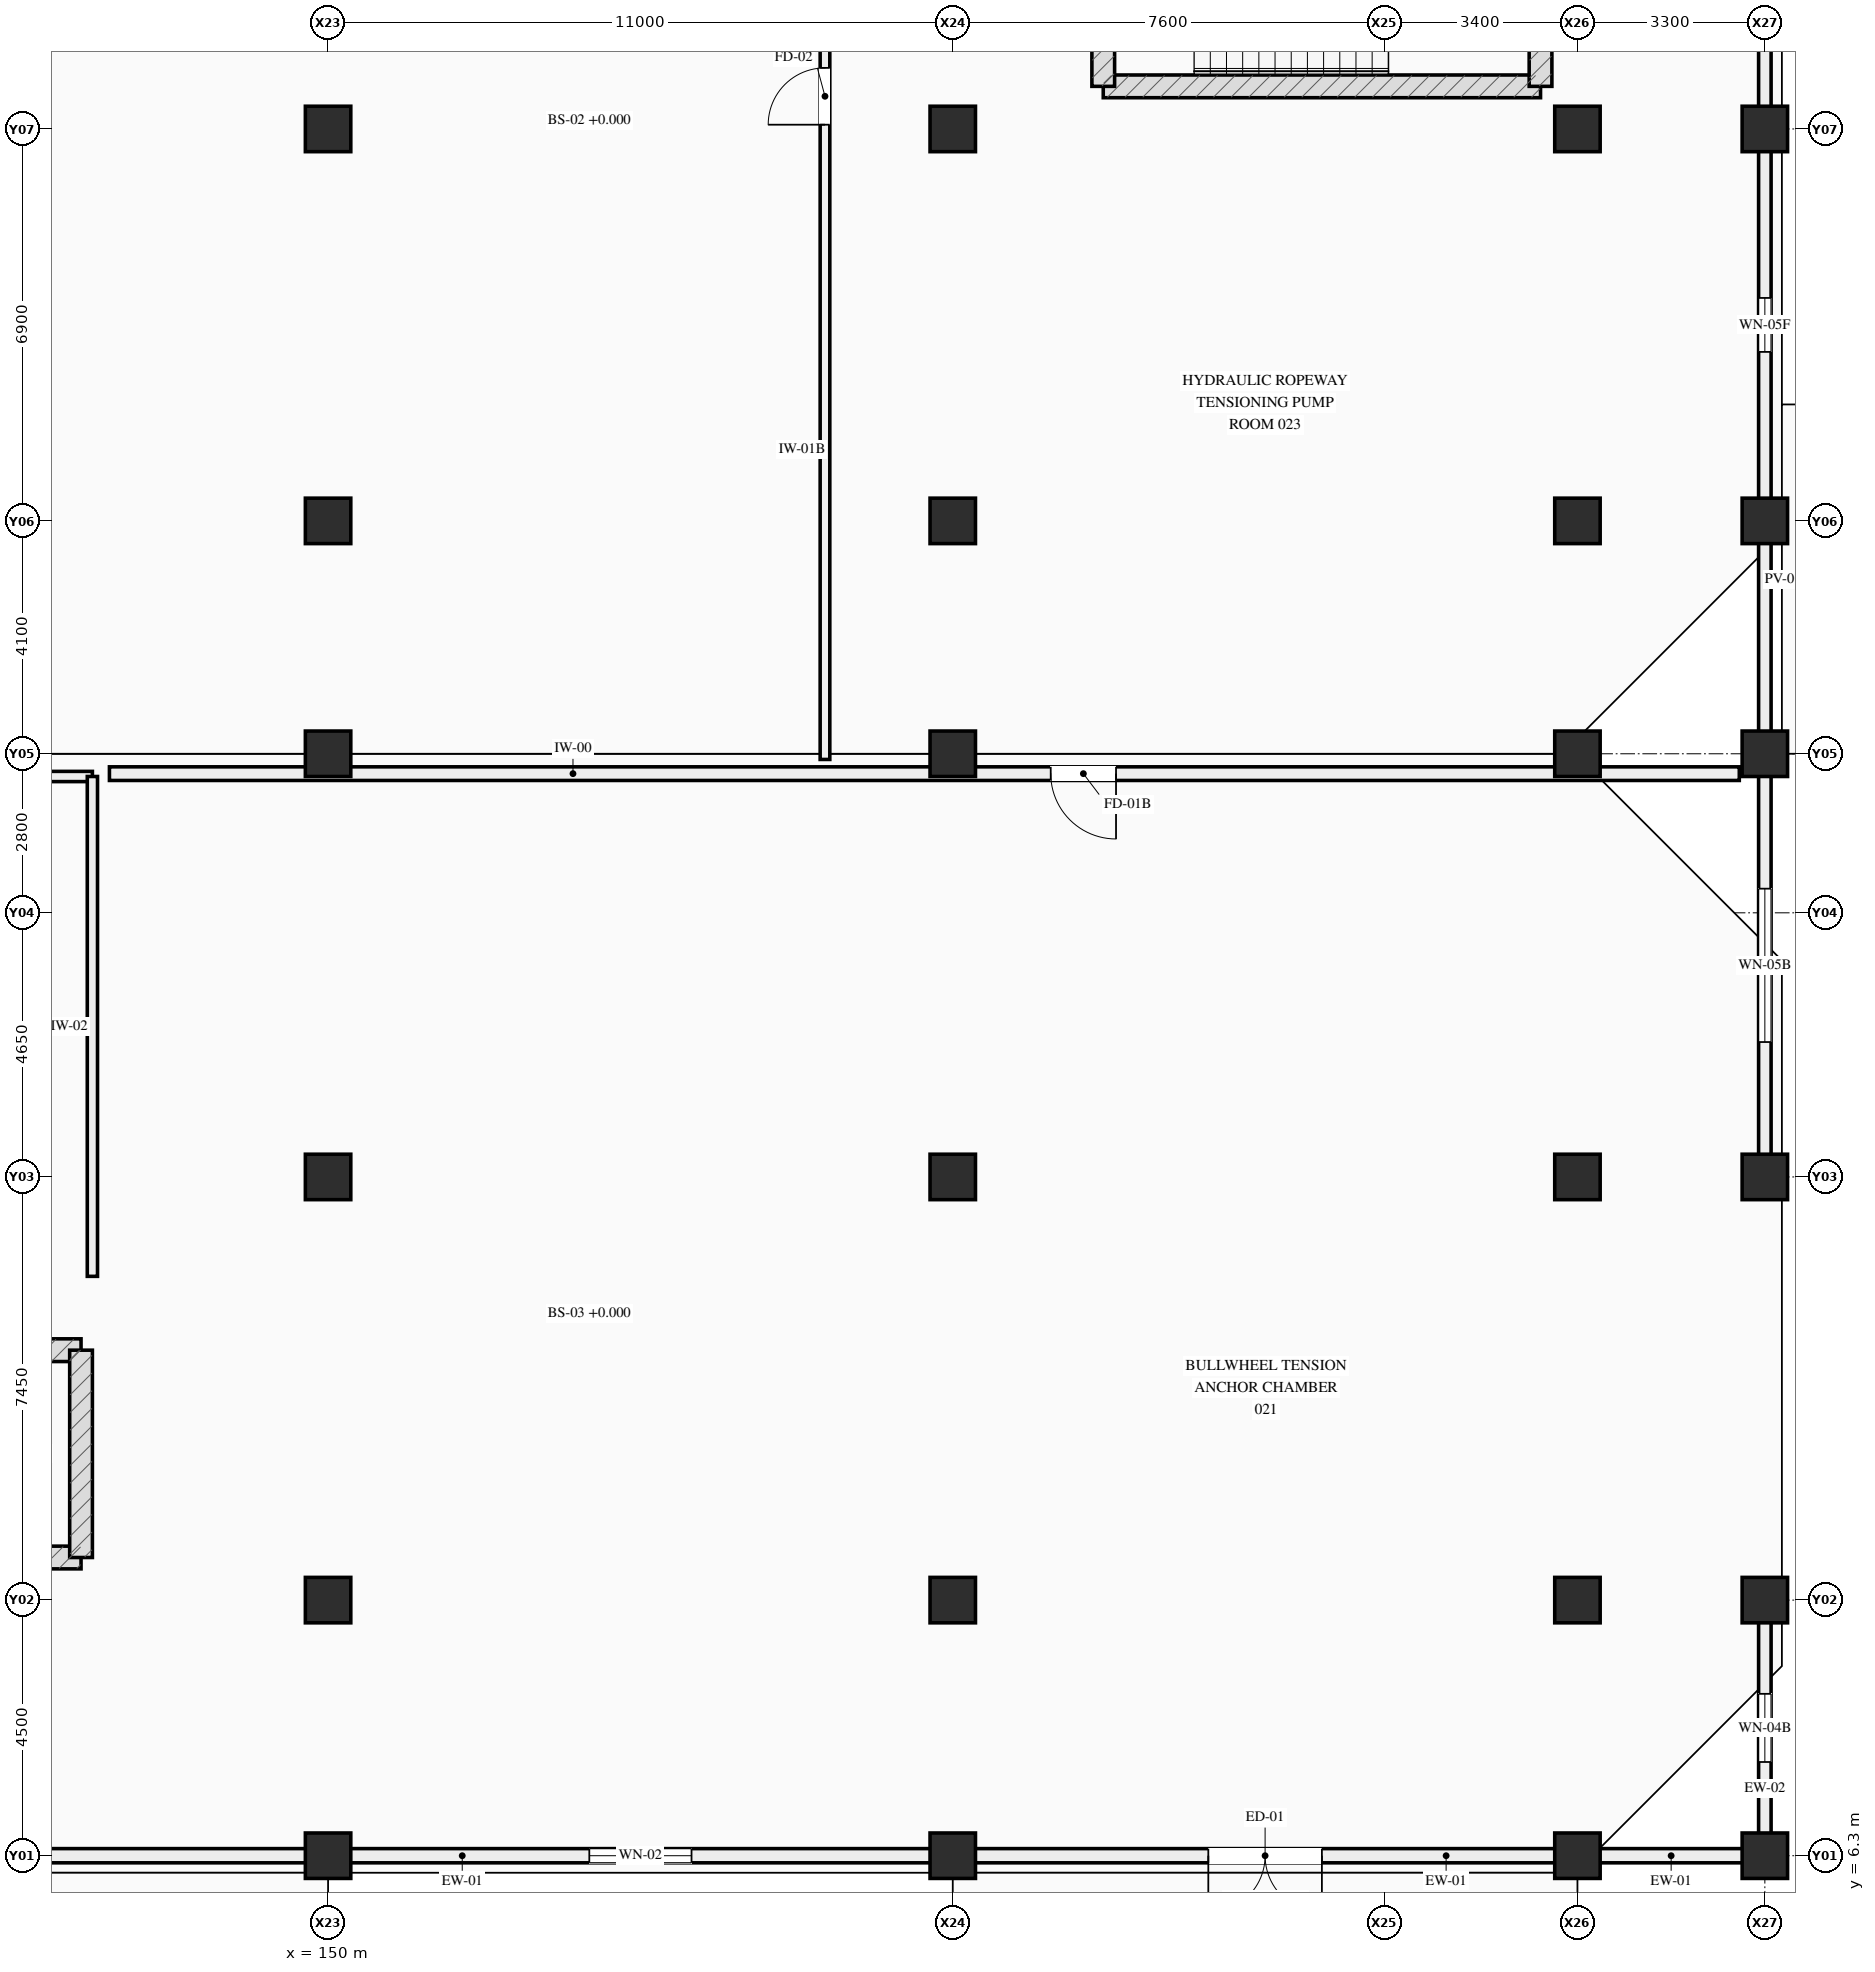
"""IFC4 building model, lengths in metres.
Left out: names, types, materials, properties, quantities, classifications, styles, units other than length and angle.
Written with IfcOpenShell. Run it as: python <this file> out.ifc"""

import sys

from ifc_helpers import new_model, si_unit, direction, frame, frame_2d, origin, origin_2d, place, context, subcontext, project, spatial, rectangle, extrude, element, fill, save


model = new_model("IFC4")
c1 = context("Model", 3, precision=1e-05, world=origin(), true_north=direction((0.0, 1.0)))
c2 = subcontext(c1, "Body", "Model", "MODEL_VIEW")
j1 = project(units=[si_unit("LENGTHUNIT", "METRE"), si_unit("PLANEANGLEUNIT", "RADIAN")], contexts=[c1])
p1 = place(None, origin())
s1 = spatial("IfcSite", under=j1, at=p1, CompositionType="ELEMENT")
p2 = place(p1, origin())
s2 = spatial("IfcBuilding", under=s1, at=p2, CompositionType="ELEMENT")
p3 = place(p2, origin())
s3 = spatial("IfcBuildingStorey", under=s2, at=p3, CompositionType="ELEMENT", Elevation=0.0)
for number, where, z_axis, x_axis in (
    (1, (150.0, 6.3, 0.0), (0.0, 0.0, 1.0), (1.0, 0.0, 0.0)),
    (2, (150.0, 10.8, 0.0), (0.0, 0.0, 1.0), (1.0, 0.0, 0.0)),
    (3, (150.0, 18.25, 0.0), (0.0, 0.0, 1.0), (1.0, 0.0, 0.0)),
    (4, (150.0, 25.7, 0.0), (0.0, 0.0, 1.0), (1.0, 0.0, 0.0)),
    (5, (150.0, 29.8, 0.0), (0.0, 0.0, 1.0), (1.0, 0.0, 0.0)),
    (6, (150.0, 36.7, 0.0), (0.0, 0.0, 1.0), (1.0, 0.0, 0.0)),
    (7, (161.0, 6.3, 0.0), (0.0, 0.0, 1.0), (1.0, 0.0, 0.0)),
    (8, (161.0, 10.8, 0.0), (0.0, 0.0, 1.0), (1.0, 0.0, 0.0)),
    (9, (161.0, 18.25, 0.0), (0.0, 0.0, 1.0), (1.0, 0.0, 0.0)),
    (10, (161.0, 25.7, 0.0), (0.0, 0.0, 1.0), (1.0, 0.0, 0.0)),
    (11, (161.0, 29.8, 0.0), (0.0, 0.0, 1.0), (1.0, 0.0, 0.0)),
    (12, (161.0, 36.7, 0.0), (0.0, 0.0, 1.0), (1.0, 0.0, 0.0)),
    (13, (172.0, 6.3, 0.0), (0.0, 0.0, 1.0), (1.0, 0.0, 0.0)),
    (14, (172.0, 10.8, 0.0), (0.0, 0.0, 1.0), (1.0, 0.0, 0.0)),
    (15, (172.0, 18.25, 0.0), (0.0, 0.0, 1.0), (1.0, 0.0, 0.0)),
    (16, (172.0, 25.7, 0.0), (0.0, 0.0, 1.0), (1.0, 0.0, 0.0)),
    (17, (172.0, 29.8, 0.0), (0.0, 0.0, 1.0), (1.0, 0.0, 0.0)),
    (18, (172.0, 36.7, 0.0), (0.0, 0.0, 1.0), (1.0, 0.0, 0.0)),
    (19, (175.3, 6.3, 0.0), (0.0, 0.0, 1.0), (1.0, 0.0, 0.0)),
    (20, (175.3, 10.8, 0.0), (0.0, 0.0, 1.0), (1.0, 0.0, 0.0)),
    (21, (175.3, 18.25, 0.0), (0.0, 0.0, 1.0), (1.0, 0.0, 0.0)),
    (22, (175.3, 25.7, 0.0), (0.0, 0.0, 1.0), (1.0, 0.0, 0.0)),
    (23, (175.3, 29.8, 0.0), (0.0, 0.0, 1.0), (1.0, 0.0, 0.0)),
    (24, (175.3, 36.7, 0.0), (0.0, 0.0, 1.0), (1.0, 0.0, 0.0)),
):
    element("IfcColumn", number, at=place(p3, frame(where, z_axis=z_axis, x_axis=x_axis)), inside=s3, PredefinedType="COLUMN", context=c2, shape_type="SweptSolid", body=[
        extrude(rectangle(XDim=0.8, YDim=0.8, at=origin_2d()), origin(), (0.0, 0.0, 1.0), 4.5),
    ])
p4 = place(p3, frame((149.625, 6.3, 0.0), z_axis=(0.0, 0.0, 1.0), x_axis=(-1.0, 0.0, 0.0)))
e25 = element("IfcWall", 25, at=p4, inside=s3, PredefinedType="STANDARD", context=c2, shape_type="SweptSolid", body=[
    extrude(rectangle(XDim=12.05, YDim=0.25, at=frame_2d((6.025, 0.0))), origin(), (0.0, 0.0, 1.0), 3.545),
])
p5 = place(p4, frame((5.025, 0.0, 0.0)))
e26 = element("IfcOpeningElement", 26, at=p5, cuts=e25, PredefinedType="OPENING", context=c2, shape_type="SweptSolid", body=[
    extrude(rectangle(XDim=2.0, YDim=2.22, at=frame_2d((1.0, 1.11))), frame((0.0, 0.135, 0.0), z_axis=(0.0, -1.0, 0.0), x_axis=(1.0, 0.0, 0.0)), (0.0, 0.0, 1.0), 0.27),
])
p6 = place(p3, frame((160.625, 6.3, 0.0), z_axis=(0.0, 0.0, 1.0), x_axis=(-1.0, 0.0, 0.0)))
e27 = element("IfcWall", 27, at=p6, inside=s3, PredefinedType="STANDARD", context=c2, shape_type="SweptSolid", body=[
    extrude(rectangle(XDim=10.25, YDim=0.25, at=frame_2d((5.125, 0.0))), origin(), (0.0, 0.0, 1.0), 3.545),
])
p7 = place(p6, frame((4.225, 0.0, 0.88)))
e28 = element("IfcOpeningElement", 28, at=p7, cuts=e27, PredefinedType="OPENING", context=c2, shape_type="SweptSolid", body=[
    extrude(rectangle(XDim=1.8, YDim=1.45, at=frame_2d((0.9, 0.725))), frame((0.0, 0.135, 0.0), z_axis=(0.0, -1.0, 0.0), x_axis=(1.0, 0.0, 0.0)), (0.0, 0.0, 1.0), 0.27),
])
p8 = place(p3, frame((171.625, 6.3, 0.0), z_axis=(0.0, 0.0, 1.0), x_axis=(-1.0, 0.0, 0.0)))
e29 = element("IfcWall", 29, at=p8, inside=s3, PredefinedType="STANDARD", context=c2, shape_type="SweptSolid", body=[
    extrude(rectangle(XDim=10.25, YDim=0.25, at=frame_2d((5.125, 0.0))), origin(), (0.0, 0.0, 1.0), 3.545),
])
p9 = place(p8, frame((4.125, 0.0, 0.0)))
e30 = element("IfcOpeningElement", 30, at=p9, cuts=e29, PredefinedType="OPENING", context=c2, shape_type="SweptSolid", body=[
    extrude(rectangle(XDim=2.0, YDim=2.22, at=frame_2d((1.0, 1.11))), frame((0.0, 0.135, 0.0), z_axis=(0.0, -1.0, 0.0), x_axis=(1.0, 0.0, 0.0)), (0.0, 0.0, 1.0), 0.27),
])
p10 = place(p3, frame((174.925, 6.3, 0.0), z_axis=(0.0, 0.0, 1.0), x_axis=(-1.0, 0.0, 0.0)))
e31 = element("IfcWall", 31, at=p10, inside=s3, PredefinedType="STANDARD", context=c2, shape_type="SweptSolid", body=[
    extrude(rectangle(XDim=2.55, YDim=0.25, at=frame_2d((1.275, 0.0))), origin(), (0.0, 0.0, 1.0), 3.545),
])
p11 = place(p3, frame((175.3, 10.425, 0.0), z_axis=(0.0, 0.0, 1.0), x_axis=(0.0, -1.0, 0.0)))
e32 = element("IfcWall", 32, at=p11, inside=s3, PredefinedType="STANDARD", context=c2, shape_type="SweptSolid", body=[
    extrude(rectangle(XDim=3.75, YDim=0.22, at=frame_2d((1.875, 0.0))), origin(), (0.0, 0.0, 1.0), 3.545),
])
p12 = place(p11, frame((1.275, 0.0, 1.05)))
e33 = element("IfcOpeningElement", 33, at=p12, cuts=e32, PredefinedType="OPENING", context=c2, shape_type="SweptSolid", body=[
    extrude(rectangle(XDim=1.2, YDim=1.15, at=frame_2d((0.6, 0.575))), frame((0.0, 0.12, 0.0), z_axis=(0.0, -1.0, 0.0), x_axis=(1.0, 0.0, 0.0)), (0.0, 0.0, 1.0), 0.24),
])
p13 = place(p3, frame((175.3, 25.325, 0.0), z_axis=(0.0, 0.0, 1.0), x_axis=(0.0, -1.0, 0.0)))
e34 = element("IfcWall", 34, at=p13, inside=s3, PredefinedType="STANDARD", context=c2, shape_type="SweptSolid", body=[
    extrude(rectangle(XDim=6.7, YDim=0.22, at=frame_2d((3.35, 0.0))), origin(), (0.0, 0.0, 1.0), 3.545),
])
p14 = place(p13, frame((2.0, 0.0, 0.88)))
e35 = element("IfcOpeningElement", 35, at=p14, cuts=e34, PredefinedType="OPENING", context=c2, shape_type="SweptSolid", body=[
    extrude(rectangle(XDim=2.7, YDim=1.45, at=frame_2d((1.35, 0.725))), frame((0.0, 0.12, 0.0), z_axis=(0.0, -1.0, 0.0), x_axis=(1.0, 0.0, 0.0)), (0.0, 0.0, 1.0), 0.24),
])
p15 = place(p3, frame((175.3, 29.425, 0.0), z_axis=(0.0, 0.0, 1.0), x_axis=(0.0, -1.0, 0.0)))
e36 = element("IfcWall", 36, at=p15, inside=s3, PredefinedType="STANDARD", context=c2, shape_type="SweptSolid", body=[
    extrude(rectangle(XDim=3.35, YDim=0.22, at=frame_2d((1.675, 0.0))), origin(), (0.0, 0.0, 1.0), 3.545),
])
p16 = place(p3, frame((175.3, 36.325, 0.0), z_axis=(0.0, 0.0, 1.0), x_axis=(0.0, -1.0, 0.0)))
e37 = element("IfcWall", 37, at=p16, inside=s3, PredefinedType="STANDARD", context=c2, shape_type="SweptSolid", body=[
    extrude(rectangle(XDim=6.15, YDim=0.22, at=frame_2d((3.075, 0.0))), origin(), (0.0, 0.0, 1.0), 3.545),
])
p17 = place(p16, frame((2.6, 0.0, 1.08)))
e38 = element("IfcOpeningElement", 38, at=p17, cuts=e37, PredefinedType="OPENING", context=c2, shape_type="SweptSolid", body=[
    extrude(rectangle(XDim=0.95, YDim=1.05, at=frame_2d((0.475, 0.525))), frame((0.0, 0.12, 0.0), z_axis=(0.0, -1.0, 0.0), x_axis=(1.0, 0.0, 0.0)), (0.0, 0.0, 1.0), 0.24),
])
p18 = place(p3, frame((175.3, 41.825, 0.0), z_axis=(0.0, 0.0, 1.0), x_axis=(0.0, -1.0, 0.0)))
e39 = element("IfcWall", 39, at=p18, inside=s3, PredefinedType="STANDARD", context=c2, shape_type="SweptSolid", body=[
    extrude(rectangle(XDim=4.75, YDim=0.22, at=frame_2d((2.375, 0.0))), origin(), (0.0, 0.0, 1.0), 3.545),
])
p19 = place(p18, frame((1.175, 0.0, 0.88)))
e40 = element("IfcOpeningElement", 40, at=p19, cuts=e39, PredefinedType="OPENING", context=c2, shape_type="SweptSolid", body=[
    extrude(rectangle(XDim=2.4, YDim=1.45, at=frame_2d((1.2, 0.725))), frame((0.0, 0.12, 0.0), z_axis=(0.0, -1.0, 0.0), x_axis=(1.0, 0.0, 0.0)), (0.0, 0.0, 1.0), 0.24),
])
for number, where, z_axis, x_axis in (
    (41, (145.65, 11.55, 0.0), (0.0, 0.0, 1.0), (-1.0, 0.0, 0.0)),
    (42, (137.95, 15.2, 0.0), (0.0, 0.0, 1.0), (1.0, 0.0, 0.0)),
):
    element("IfcWall", number, at=place(p3, frame(where, z_axis=z_axis, x_axis=x_axis)), inside=s3, PredefinedType="SHEAR", context=c2, shape_type="SweptSolid", body=[
        extrude(rectangle(XDim=7.7, YDim=0.4, at=frame_2d((3.85, 0.0))), origin(), (0.0, 0.0, 1.0), 4.215),
    ])
p20 = place(p3, frame((145.65, 15.2, 0.0), z_axis=(0.0, 0.0, 1.0), x_axis=(0.0, -1.0, 0.0)))
e43 = element("IfcWall", 43, at=p20, inside=s3, PredefinedType="SHEAR", context=c2, shape_type="SweptSolid", body=[
    extrude(rectangle(XDim=3.65, YDim=0.4, at=frame_2d((1.825, 0.0))), origin(), (0.0, 0.0, 1.0), 4.215),
])
p21 = place(p3, frame((171.35, 37.45, 0.0), z_axis=(0.0, 0.0, 1.0), x_axis=(-1.0, 0.0, 0.0)))
e44 = element("IfcWall", 44, at=p21, inside=s3, PredefinedType="SHEAR", context=c2, shape_type="SweptSolid", body=[
    extrude(rectangle(XDim=7.7, YDim=0.4, at=frame_2d((3.85, 0.0))), origin(), (0.0, 0.0, 1.0), 4.215),
])
for number, where, z_axis, x_axis in (
    (45, (163.65, 37.45, 0.0), (0.0, 0.0, 1.0), (0.0, 1.0, 0.0)),
    (46, (171.35, 41.1, 0.0), (0.0, 0.0, 1.0), (0.0, -1.0, 0.0)),
):
    element("IfcWall", number, at=place(p3, frame(where, z_axis=z_axis, x_axis=x_axis)), inside=s3, PredefinedType="SHEAR", context=c2, shape_type="SweptSolid", body=[
        extrude(rectangle(XDim=3.65, YDim=0.4, at=frame_2d((1.825, 0.0))), origin(), (0.0, 0.0, 1.0), 4.215),
    ])
p22 = place(p3, frame((146.15, 25.35, 0.0), z_axis=(0.0, 0.0, 1.0), x_axis=(1.0, 0.0, 0.0)))
e47 = element("IfcWall", 47, at=p22, inside=s3, PredefinedType="SOLIDWALL", context=c2, shape_type="SweptSolid", body=[
    extrude(rectangle(XDim=28.7, YDim=0.24, at=frame_2d((14.35, 0.0))), origin(), (0.0, 0.0, 1.0), 3.3),
])
p23 = place(p22, frame((16.575, 0.0, 0.0)))
e48 = element("IfcOpeningElement", 48, at=p23, cuts=e47, PredefinedType="OPENING", context=c2, shape_type="SweptSolid", body=[
    extrude(rectangle(XDim=1.15, YDim=2.2, at=frame_2d((0.575, 1.1))), frame((0.0, 0.13, 0.0), z_axis=(0.0, -1.0, 0.0), x_axis=(1.0, 0.0, 0.0)), (0.0, 0.0, 1.0), 0.26),
])
p24 = place(p3, frame((158.75, 25.6, 0.0), z_axis=(0.0, 0.0, 1.0), x_axis=(0.0, 1.0, 0.0)))
e49 = element("IfcWall", 49, at=p24, inside=s3, PredefinedType="SOLIDWALL", context=c2, shape_type="SweptSolid", body=[
    extrude(rectangle(XDim=15.65, YDim=0.17, at=frame_2d((7.825, 0.0))), origin(), (0.0, 0.0, 1.0), 3.3),
])
p25 = place(p24, frame((11.175, 0.0, 0.0)))
e50 = element("IfcOpeningElement", 50, at=p25, cuts=e49, PredefinedType="OPENING", context=c2, shape_type="SweptSolid", body=[
    extrude(rectangle(XDim=1.0, YDim=2.15, at=frame_2d((0.5, 1.075))), frame((0.0, 0.095, 0.0), z_axis=(0.0, -1.0, 0.0), x_axis=(1.0, 0.0, 0.0)), (0.0, 0.0, 1.0), 0.19),
])
p26 = place(p3, frame((139.8, 25.3, 0.0), z_axis=(0.0, 0.0, 1.0), x_axis=(1.0, 0.0, 0.0)))
e51 = element("IfcWall", 51, at=p26, inside=s3, PredefinedType="PLUMBINGWALL", context=c2, shape_type="SweptSolid", body=[
    extrude(rectangle(XDim=6.05, YDim=0.18, at=frame_2d((3.025, 0.0))), origin(), (0.0, 0.0, 1.0), 3.3),
])
p27 = place(p3, frame((145.85, 16.5, 0.0), z_axis=(0.0, 0.0, 1.0), x_axis=(0.0, 1.0, 0.0)))
e52 = element("IfcWall", 52, at=p27, inside=s3, PredefinedType="PLUMBINGWALL", context=c2, shape_type="SweptSolid", body=[
    extrude(rectangle(XDim=8.8, YDim=0.18, at=frame_2d((4.4, 0.0))), origin(), (0.0, 0.0, 1.0), 3.3),
])
p28 = place(p7, origin())
e53 = element("IfcWindow", 53, at=p28, inside=s3, PartitioningType="SINGLE_PANEL", PredefinedType="WINDOW", context=c2, shape_type="SweptSolid", body=[
    extrude(rectangle(XDim=1.8, YDim=1.45, at=frame_2d((0.9, 0.725))), frame((0.0, 0.03, 0.0), z_axis=(0.0, -1.0, 0.0), x_axis=(1.0, 0.0, 0.0)), (0.0, 0.0, 1.0), 0.06),
])
fill(e28, e53)
p29 = place(p9, origin())
e54 = element("IfcDoor", 54, at=p29, inside=s3, OperationType="DOUBLE_DOOR_SINGLE_SWING", PredefinedType="DOOR", context=c2, shape_type="SweptSolid", body=[
    extrude(rectangle(XDim=2.0, YDim=2.22, at=frame_2d((1.0, 1.11))), frame((0.0, 0.025, 0.0), z_axis=(0.0, -1.0, 0.0), x_axis=(1.0, 0.0, 0.0)), (0.0, 0.0, 1.0), 0.05),
])
fill(e30, e54)
p30 = place(p12, origin())
e55 = element("IfcWindow", 55, at=p30, inside=s3, PartitioningType="SINGLE_PANEL", PredefinedType="WINDOW", context=c2, shape_type="SweptSolid", body=[
    extrude(rectangle(XDim=1.2, YDim=1.15, at=frame_2d((0.6, 0.575))), frame((0.0, 0.03, 0.0), z_axis=(0.0, -1.0, 0.0), x_axis=(1.0, 0.0, 0.0)), (0.0, 0.0, 1.0), 0.06),
])
fill(e33, e55)
p31 = place(p14, origin())
e56 = element("IfcWindow", 56, at=p31, inside=s3, PartitioningType="SINGLE_PANEL", PredefinedType="WINDOW", context=c2, shape_type="SweptSolid", body=[
    extrude(rectangle(XDim=2.7, YDim=1.45, at=frame_2d((1.35, 0.725))), frame((0.0, 0.03, 0.0), z_axis=(0.0, -1.0, 0.0), x_axis=(1.0, 0.0, 0.0)), (0.0, 0.0, 1.0), 0.06),
])
fill(e35, e56)
p32 = place(p17, origin())
e57 = element("IfcWindow", 57, at=p32, inside=s3, PartitioningType="SINGLE_PANEL", PredefinedType="WINDOW", context=c2, shape_type="SweptSolid", body=[
    extrude(rectangle(XDim=0.95, YDim=1.05, at=frame_2d((0.475, 0.525))), frame((0.0, 0.03, 0.0), z_axis=(0.0, -1.0, 0.0), x_axis=(1.0, 0.0, 0.0)), (0.0, 0.0, 1.0), 0.06),
])
fill(e38, e57)
p33 = place(p23, origin())
e58 = element("IfcDoor", 58, at=p33, inside=s3, OperationType="SINGLE_SWING_RIGHT", PredefinedType="DOOR", context=c2, shape_type="SweptSolid", body=[
    extrude(rectangle(XDim=1.15, YDim=2.2, at=frame_2d((0.575, 1.1))), frame((0.0, 0.025, 0.0), z_axis=(0.0, -1.0, 0.0), x_axis=(1.0, 0.0, 0.0)), (0.0, 0.0, 1.0), 0.05),
])
fill(e48, e58)
p34 = place(p25, origin())
e59 = element("IfcDoor", 59, at=p34, inside=s3, OperationType="SINGLE_SWING_LEFT", PredefinedType="DOOR", context=c2, shape_type="SweptSolid", body=[
    extrude(rectangle(XDim=1.0, YDim=2.15, at=frame_2d((0.5, 1.075))), frame((0.0, 0.025, 0.0), z_axis=(0.0, -1.0, 0.0), x_axis=(1.0, 0.0, 0.0)), (0.0, 0.0, 1.0), 0.05),
])
fill(e50, e59)
save(model, sys.argv[1])
